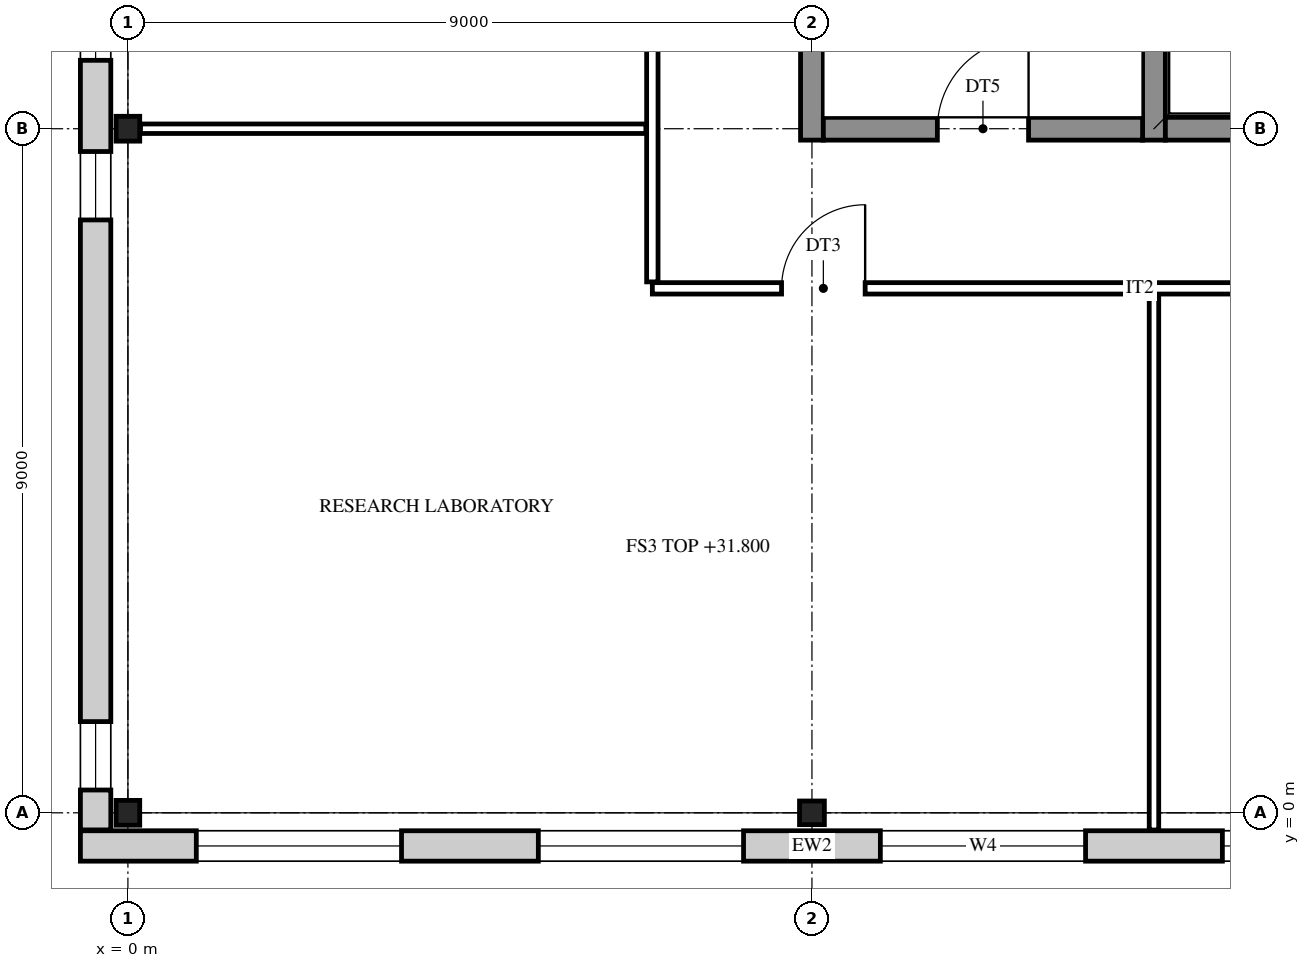
"""IFC4 building model, lengths in metres.
Left out: names, types, materials, properties, quantities, classifications, styles, units other than length and angle.
Written with IfcOpenShell. Run it as: python <this file> out.ifc"""

import sys

from ifc_helpers import new_model, si_unit, direction, frame, frame_2d, origin, origin_2d, place, context, subcontext, project, spatial, rectangle, i_section, extrude, element, fill, save


model = new_model("IFC4")
c1 = context("Model", 3, precision=1e-05, world=origin(), true_north=direction((0.0, 1.0)))
c2 = subcontext(c1, "Body", "Model", "MODEL_VIEW")
j1 = project(units=[si_unit("LENGTHUNIT", "METRE"), si_unit("PLANEANGLEUNIT", "RADIAN")], contexts=[c1])
p1 = place(None, origin())
s1 = spatial("IfcSite", under=j1, at=p1, CompositionType="ELEMENT")
p2 = place(p1, origin())
s2 = spatial("IfcBuilding", under=s1, at=p2, CompositionType="ELEMENT")
p3 = place(p2, frame((0.0, 0.0, 31.8)))
s3 = spatial("IfcBuildingStorey", under=s2, at=p3, CompositionType="ELEMENT", Elevation=31.8)
for number, where, z_axis, x_axis in (
    (1, (0.0, 0.0, 0.0), (0.0, 0.0, 1.0), (1.0, 0.0, 0.0)),
    (2, (0.0, 9.0, 0.0), (0.0, 0.0, 1.0), (1.0, 0.0, 0.0)),
    (3, (9.0, 0.0, 0.0), (0.0, 0.0, 1.0), (0.0, 1.0, 0.0)),
):
    element("IfcColumn", number, at=place(p3, frame(where, z_axis=z_axis, x_axis=x_axis)), inside=s3, PredefinedType="COLUMN", context=c2, shape_type="SweptSolid", body=[
        extrude(i_section(OverallWidth=0.311, OverallDepth=0.327, WebThickness=0.016, FlangeThickness=0.025, FilletRadius=0.017, at=origin_2d()), origin(), (0.0, 0.0, 1.0), 4.2),
    ])
for number, where, z_axis, x_axis in (
    (4, (9.0, 8.85, 0.0), (0.0, 0.0, 1.0), (0.0, 1.0, 0.0)),
    (5, (13.5, 8.85, 0.0), (0.0, 0.0, 1.0), (0.0, 1.0, 0.0)),
):
    element("IfcWall", number, at=place(p3, frame(where, z_axis=z_axis, x_axis=x_axis)), inside=s3, PredefinedType="SHEAR", context=c2, shape_type="SweptSolid", body=[
        extrude(rectangle(XDim=9.3, YDim=0.3, at=frame_2d((4.65, 0.0))), origin(), (0.0, 0.0, 1.0), 4.2),
    ])
p4 = place(p3, frame((9.15, 9.0, 0.0), z_axis=(0.0, 0.0, 1.0), x_axis=(1.0, 0.0, 0.0)))
e6 = element("IfcWall", 6, at=p4, inside=s3, PredefinedType="SHEAR", context=c2, shape_type="SweptSolid", body=[
    extrude(rectangle(XDim=4.2, YDim=0.3, at=frame_2d((2.1, 0.0))), origin(), (0.0, 0.0, 1.0), 4.2),
])
p5 = place(p4, frame((1.5, 0.0, 0.0)))
e7 = element("IfcOpeningElement", 7, at=p5, cuts=e6, PredefinedType="OPENING", context=c2, shape_type="SweptSolid", body=[
    extrude(rectangle(XDim=1.2, YDim=2.1, at=frame_2d((0.6, 1.05))), frame((0.0, 0.16, 0.0), z_axis=(0.0, -1.0, 0.0), x_axis=(1.0, 0.0, 0.0)), (0.0, 0.0, 1.0), 0.32),
])
p6 = place(p3, frame((13.65, 9.0, 0.0), z_axis=(0.0, 0.0, 1.0), x_axis=(1.0, 0.0, 0.0)))
e8 = element("IfcWall", 8, at=p6, inside=s3, PredefinedType="SHEAR", context=c2, shape_type="SweptSolid", body=[
    extrude(rectangle(XDim=2.7, YDim=0.3, at=frame_2d((1.35, 0.0))), origin(), (0.0, 0.0, 1.0), 4.2),
])
p7 = place(p3, frame((32.125, -0.436, 0.0), z_axis=(0.0, 0.0, 1.0), x_axis=(-1.0, 0.0, 0.0)))
e9 = element("IfcWall", 9, at=p7, inside=s3, PredefinedType="STANDARD", context=c2, shape_type="SweptSolid", body=[
    extrude(rectangle(XDim=32.75, YDim=0.4, at=frame_2d((16.375, 0.0))), origin(), (0.0, 0.0, 1.0), 4.2),
])
p8 = place(p7, frame((28.525, 0.0, 0.9)))
e10 = element("IfcOpeningElement", 10, at=p8, cuts=e9, PredefinedType="OPENING", context=c2, shape_type="SweptSolid", body=[
    extrude(rectangle(XDim=2.7, YDim=2.5, at=frame_2d((1.35, 1.25))), frame((0.0, 0.21, 0.0), z_axis=(0.0, -1.0, 0.0), x_axis=(1.0, 0.0, 0.0)), (0.0, 0.0, 1.0), 0.42),
])
p9 = place(p7, frame((24.025, 0.0, 0.9)))
e11 = element("IfcOpeningElement", 11, at=p9, cuts=e9, PredefinedType="OPENING", context=c2, shape_type="SweptSolid", body=[
    extrude(rectangle(XDim=2.7, YDim=2.5, at=frame_2d((1.35, 1.25))), frame((0.0, 0.21, 0.0), z_axis=(0.0, -1.0, 0.0), x_axis=(1.0, 0.0, 0.0)), (0.0, 0.0, 1.0), 0.42),
])
p10 = place(p7, frame((19.525, 0.0, 0.9)))
e12 = element("IfcOpeningElement", 12, at=p10, cuts=e9, PredefinedType="OPENING", context=c2, shape_type="SweptSolid", body=[
    extrude(rectangle(XDim=2.7, YDim=2.5, at=frame_2d((1.35, 1.25))), frame((0.0, 0.21, 0.0), z_axis=(0.0, -1.0, 0.0), x_axis=(1.0, 0.0, 0.0)), (0.0, 0.0, 1.0), 0.42),
])
p11 = place(p7, frame((15.025, 0.0, 0.9)))
e13 = element("IfcOpeningElement", 13, at=p11, cuts=e9, PredefinedType="OPENING", context=c2, shape_type="SweptSolid", body=[
    extrude(rectangle(XDim=2.7, YDim=2.5, at=frame_2d((1.35, 1.25))), frame((0.0, 0.21, 0.0), z_axis=(0.0, -1.0, 0.0), x_axis=(1.0, 0.0, 0.0)), (0.0, 0.0, 1.0), 0.42),
])
p12 = place(p7, frame((10.525, 0.0, 0.9)))
e14 = element("IfcOpeningElement", 14, at=p12, cuts=e9, PredefinedType="OPENING", context=c2, shape_type="SweptSolid", body=[
    extrude(rectangle(XDim=2.7, YDim=2.5, at=frame_2d((1.35, 1.25))), frame((0.0, 0.21, 0.0), z_axis=(0.0, -1.0, 0.0), x_axis=(1.0, 0.0, 0.0)), (0.0, 0.0, 1.0), 0.42),
])
p13 = place(p7, frame((6.025, 0.0, 0.9)))
e15 = element("IfcOpeningElement", 15, at=p13, cuts=e9, PredefinedType="OPENING", context=c2, shape_type="SweptSolid", body=[
    extrude(rectangle(XDim=2.7, YDim=2.5, at=frame_2d((1.35, 1.25))), frame((0.0, 0.21, 0.0), z_axis=(0.0, -1.0, 0.0), x_axis=(1.0, 0.0, 0.0)), (0.0, 0.0, 1.0), 0.42),
])
p14 = place(p7, frame((1.525, 0.0, 0.9)))
e16 = element("IfcOpeningElement", 16, at=p14, cuts=e9, PredefinedType="OPENING", context=c2, shape_type="SweptSolid", body=[
    extrude(rectangle(XDim=2.7, YDim=2.5, at=frame_2d((1.35, 1.25))), frame((0.0, 0.21, 0.0), z_axis=(0.0, -1.0, 0.0), x_axis=(1.0, 0.0, 0.0)), (0.0, 0.0, 1.0), 0.42),
])
p15 = place(p3, frame((-0.425, -0.225, 0.0), z_axis=(0.0, 0.0, 1.0), x_axis=(0.0, 1.0, 0.0)))
e17 = element("IfcWall", 17, at=p15, inside=s3, PredefinedType="STANDARD", context=c2, shape_type="SweptSolid", body=[
    extrude(rectangle(XDim=27.45, YDim=0.4, at=frame_2d((13.725, 0.0))), origin(), (0.0, 0.0, 1.0), 4.2),
])
p16 = place(p15, frame((0.525, 0.0, 0.9)))
e18 = element("IfcOpeningElement", 18, at=p16, cuts=e17, PredefinedType="OPENING", context=c2, shape_type="SweptSolid", body=[
    extrude(rectangle(XDim=0.9, YDim=2.0, at=frame_2d((0.45, 1.0))), frame((0.0, 0.21, 0.0), z_axis=(0.0, -1.0, 0.0), x_axis=(1.0, 0.0, 0.0)), (0.0, 0.0, 1.0), 0.42),
])
p17 = place(p15, frame((8.025, 0.0, 0.9)))
e19 = element("IfcOpeningElement", 19, at=p17, cuts=e17, PredefinedType="OPENING", context=c2, shape_type="SweptSolid", body=[
    extrude(rectangle(XDim=0.9, YDim=2.0, at=frame_2d((0.45, 1.0))), frame((0.0, 0.21, 0.0), z_axis=(0.0, -1.0, 0.0), x_axis=(1.0, 0.0, 0.0)), (0.0, 0.0, 1.0), 0.42),
])
p18 = place(p15, frame((10.125, 0.0, 0.9)))
e20 = element("IfcOpeningElement", 20, at=p18, cuts=e17, PredefinedType="OPENING", context=c2, shape_type="SweptSolid", body=[
    extrude(rectangle(XDim=2.7, YDim=2.5, at=frame_2d((1.35, 1.25))), frame((0.0, 0.21, 0.0), z_axis=(0.0, -1.0, 0.0), x_axis=(1.0, 0.0, 0.0)), (0.0, 0.0, 1.0), 0.42),
])
p19 = place(p15, frame((14.625, 0.0, 0.9)))
e21 = element("IfcOpeningElement", 21, at=p19, cuts=e17, PredefinedType="OPENING", context=c2, shape_type="SweptSolid", body=[
    extrude(rectangle(XDim=2.7, YDim=2.5, at=frame_2d((1.35, 1.25))), frame((0.0, 0.21, 0.0), z_axis=(0.0, -1.0, 0.0), x_axis=(1.0, 0.0, 0.0)), (0.0, 0.0, 1.0), 0.42),
])
p20 = place(p15, frame((18.525, 0.0, 0.9)))
e22 = element("IfcOpeningElement", 22, at=p20, cuts=e17, PredefinedType="OPENING", context=c2, shape_type="SweptSolid", body=[
    extrude(rectangle(XDim=0.9, YDim=2.0, at=frame_2d((0.45, 1.0))), frame((0.0, 0.21, 0.0), z_axis=(0.0, -1.0, 0.0), x_axis=(1.0, 0.0, 0.0)), (0.0, 0.0, 1.0), 0.42),
])
p21 = place(p15, frame((26.025, 0.0, 0.9)))
e23 = element("IfcOpeningElement", 23, at=p21, cuts=e17, PredefinedType="OPENING", context=c2, shape_type="SweptSolid", body=[
    extrude(rectangle(XDim=0.9, YDim=2.0, at=frame_2d((0.45, 1.0))), frame((0.0, 0.21, 0.0), z_axis=(0.0, -1.0, 0.0), x_axis=(1.0, 0.0, 0.0)), (0.0, 0.0, 1.0), 0.42),
])
p22 = place(p3, frame((6.9, 6.985, 0.0), z_axis=(0.0, 0.0, 1.0), x_axis=(0.0, 1.0, 0.0)))
e24 = element("IfcWall", 24, at=p22, inside=s3, PredefinedType="PARTITIONING", context=c2, shape_type="SweptSolid", body=[
    extrude(rectangle(XDim=13.03, YDim=0.15, at=frame_2d((6.515, 0.0))), origin(), (0.0, 0.0, 1.0), 3.537),
])
p23 = place(p22, frame((11.565, 0.0, 0.0)))
e25 = element("IfcOpeningElement", 25, at=p23, cuts=e24, PredefinedType="OPENING", context=c2, shape_type="SweptSolid", body=[
    extrude(rectangle(XDim=1.0, YDim=2.1, at=frame_2d((0.5, 1.05))), frame((0.0, 0.085, 0.0), z_axis=(0.0, -1.0, 0.0), x_axis=(1.0, 0.0, 0.0)), (0.0, 0.0, 1.0), 0.17),
])
p24 = place(p22, frame((5.965, 0.0, 0.0)))
e26 = element("IfcOpeningElement", 26, at=p24, cuts=e24, PredefinedType="OPENING", context=c2, shape_type="SweptSolid", body=[
    extrude(rectangle(XDim=1.1, YDim=2.1, at=frame_2d((0.55, 1.05))), frame((0.0, 0.085, 0.0), z_axis=(0.0, -1.0, 0.0), x_axis=(1.0, 0.0, 0.0)), (0.0, 0.0, 1.0), 0.17),
])
p25 = place(p3, frame((13.5, -0.226, 0.0), z_axis=(0.0, 0.0, 1.0), x_axis=(0.0, 1.0, 0.0)))
e27 = element("IfcWall", 27, at=p25, inside=s3, PredefinedType="PARTITIONING", context=c2, shape_type="SweptSolid", body=[
    extrude(rectangle(XDim=7.041, YDim=0.125, at=frame_2d((3.521, 0.0))), origin(), (0.0, 0.0, 1.0), 3.537),
])
p26 = place(p3, frame((6.9, 6.9, 0.0), z_axis=(0.0, 0.0, 1.0), x_axis=(1.0, 0.0, 0.0)))
e28 = element("IfcWall", 28, at=p26, inside=s3, PredefinedType="PARTITIONING", context=c2, shape_type="SweptSolid", body=[
    extrude(rectangle(XDim=20.1, YDim=0.15, at=frame_2d((10.05, 0.0))), origin(), (0.0, 0.0, 1.0), 3.537),
])
p27 = place(p26, frame((1.7, 0.0, 0.0)))
e29 = element("IfcOpeningElement", 29, at=p27, cuts=e28, PredefinedType="OPENING", context=c2, shape_type="SweptSolid", body=[
    extrude(rectangle(XDim=1.1, YDim=2.1, at=frame_2d((0.55, 1.05))), frame((0.0, 0.085, 0.0), z_axis=(0.0, -1.0, 0.0), x_axis=(1.0, 0.0, 0.0)), (0.0, 0.0, 1.0), 0.17),
])
p28 = place(p26, frame((17.975, 0.0, 0.0)))
e30 = element("IfcOpeningElement", 30, at=p28, cuts=e28, PredefinedType="OPENING", context=c2, shape_type="SweptSolid", body=[
    extrude(rectangle(XDim=1.1, YDim=2.1, at=frame_2d((0.55, 1.05))), frame((0.0, 0.085, 0.0), z_axis=(0.0, -1.0, 0.0), x_axis=(1.0, 0.0, 0.0)), (0.0, 0.0, 1.0), 0.17),
])
p29 = place(p26, frame((10.025, 0.0, 0.0)))
e31 = element("IfcOpeningElement", 31, at=p29, cuts=e28, PredefinedType="OPENING", context=c2, shape_type="SweptSolid", body=[
    extrude(rectangle(XDim=1.1, YDim=2.1, at=frame_2d((0.55, 1.05))), frame((0.0, 0.085, 0.0), z_axis=(0.0, -1.0, 0.0), x_axis=(1.0, 0.0, 0.0)), (0.0, 0.0, 1.0), 0.17),
])
p30 = place(p3, frame((0.166, 9.0, 0.0), z_axis=(0.0, 0.0, 1.0), x_axis=(1.0, 0.0, 0.0)))
e32 = element("IfcWall", 32, at=p30, inside=s3, PredefinedType="PARTITIONING", context=c2, shape_type="SweptSolid", body=[
    extrude(rectangle(XDim=6.649, YDim=0.125, at=frame_2d((3.325, 0.0))), origin(), (0.0, 0.0, 1.0), 3.537),
])
p31 = place(p8, origin())
e33 = element("IfcWindow", 33, at=p31, inside=s3, PartitioningType="SINGLE_PANEL", PredefinedType="WINDOW", context=c2, shape_type="SweptSolid", body=[
    extrude(rectangle(XDim=2.7, YDim=2.5, at=frame_2d((1.35, 1.25))), frame((0.0, 0.03, 0.0), z_axis=(0.0, -1.0, 0.0), x_axis=(1.0, 0.0, 0.0)), (0.0, 0.0, 1.0), 0.06),
])
fill(e10, e33)
p32 = place(p9, origin())
e34 = element("IfcWindow", 34, at=p32, inside=s3, PartitioningType="SINGLE_PANEL", PredefinedType="WINDOW", context=c2, shape_type="SweptSolid", body=[
    extrude(rectangle(XDim=2.7, YDim=2.5, at=frame_2d((1.35, 1.25))), frame((0.0, 0.03, 0.0), z_axis=(0.0, -1.0, 0.0), x_axis=(1.0, 0.0, 0.0)), (0.0, 0.0, 1.0), 0.06),
])
fill(e11, e34)
p33 = place(p10, origin())
e35 = element("IfcWindow", 35, at=p33, inside=s3, PartitioningType="SINGLE_PANEL", PredefinedType="WINDOW", context=c2, shape_type="SweptSolid", body=[
    extrude(rectangle(XDim=2.7, YDim=2.5, at=frame_2d((1.35, 1.25))), frame((0.0, 0.03, 0.0), z_axis=(0.0, -1.0, 0.0), x_axis=(1.0, 0.0, 0.0)), (0.0, 0.0, 1.0), 0.06),
])
fill(e12, e35)
p34 = place(p11, origin())
e36 = element("IfcWindow", 36, at=p34, inside=s3, PartitioningType="SINGLE_PANEL", PredefinedType="WINDOW", context=c2, shape_type="SweptSolid", body=[
    extrude(rectangle(XDim=2.7, YDim=2.5, at=frame_2d((1.35, 1.25))), frame((0.0, 0.03, 0.0), z_axis=(0.0, -1.0, 0.0), x_axis=(1.0, 0.0, 0.0)), (0.0, 0.0, 1.0), 0.06),
])
fill(e13, e36)
p35 = place(p16, origin())
e37 = element("IfcWindow", 37, at=p35, inside=s3, PartitioningType="SINGLE_PANEL", PredefinedType="WINDOW", context=c2, shape_type="SweptSolid", body=[
    extrude(rectangle(XDim=0.9, YDim=2.0, at=frame_2d((0.45, 1.0))), frame((0.0, 0.03, 0.0), z_axis=(0.0, -1.0, 0.0), x_axis=(1.0, 0.0, 0.0)), (0.0, 0.0, 1.0), 0.06),
])
fill(e18, e37)
p36 = place(p17, origin())
e38 = element("IfcWindow", 38, at=p36, inside=s3, PartitioningType="SINGLE_PANEL", PredefinedType="WINDOW", context=c2, shape_type="SweptSolid", body=[
    extrude(rectangle(XDim=0.9, YDim=2.0, at=frame_2d((0.45, 1.0))), frame((0.0, 0.03, 0.0), z_axis=(0.0, -1.0, 0.0), x_axis=(1.0, 0.0, 0.0)), (0.0, 0.0, 1.0), 0.06),
])
fill(e19, e38)
p37 = place(p18, origin())
e39 = element("IfcWindow", 39, at=p37, inside=s3, PartitioningType="SINGLE_PANEL", PredefinedType="WINDOW", context=c2, shape_type="SweptSolid", body=[
    extrude(rectangle(XDim=2.7, YDim=2.5, at=frame_2d((1.35, 1.25))), frame((0.0, 0.03, 0.0), z_axis=(0.0, -1.0, 0.0), x_axis=(1.0, 0.0, 0.0)), (0.0, 0.0, 1.0), 0.06),
])
fill(e20, e39)
p38 = place(p5, origin())
e40 = element("IfcDoor", 40, at=p38, inside=s3, OperationType="SINGLE_SWING_RIGHT", PredefinedType="DOOR", context=c2, shape_type="SweptSolid", body=[
    extrude(rectangle(XDim=1.2, YDim=2.1, at=frame_2d((0.6, 1.05))), frame((0.0, 0.025, 0.0), z_axis=(0.0, -1.0, 0.0), x_axis=(1.0, 0.0, 0.0)), (0.0, 0.0, 1.0), 0.05),
])
fill(e7, e40)
p39 = place(p27, frame((1.1, 0.0, 0.0), z_axis=(0.0, 0.0, 1.0), x_axis=(-1.0, 0.0, 0.0)))
e41 = element("IfcDoor", 41, at=p39, inside=s3, OperationType="SINGLE_SWING_RIGHT", PredefinedType="DOOR", context=c2, shape_type="SweptSolid", body=[
    extrude(rectangle(XDim=1.1, YDim=2.1, at=frame_2d((0.55, 1.05))), frame((0.0, 0.025, 0.0), z_axis=(0.0, -1.0, 0.0), x_axis=(1.0, 0.0, 0.0)), (0.0, 0.0, 1.0), 0.05),
])
fill(e29, e41)
save(model, sys.argv[1])
